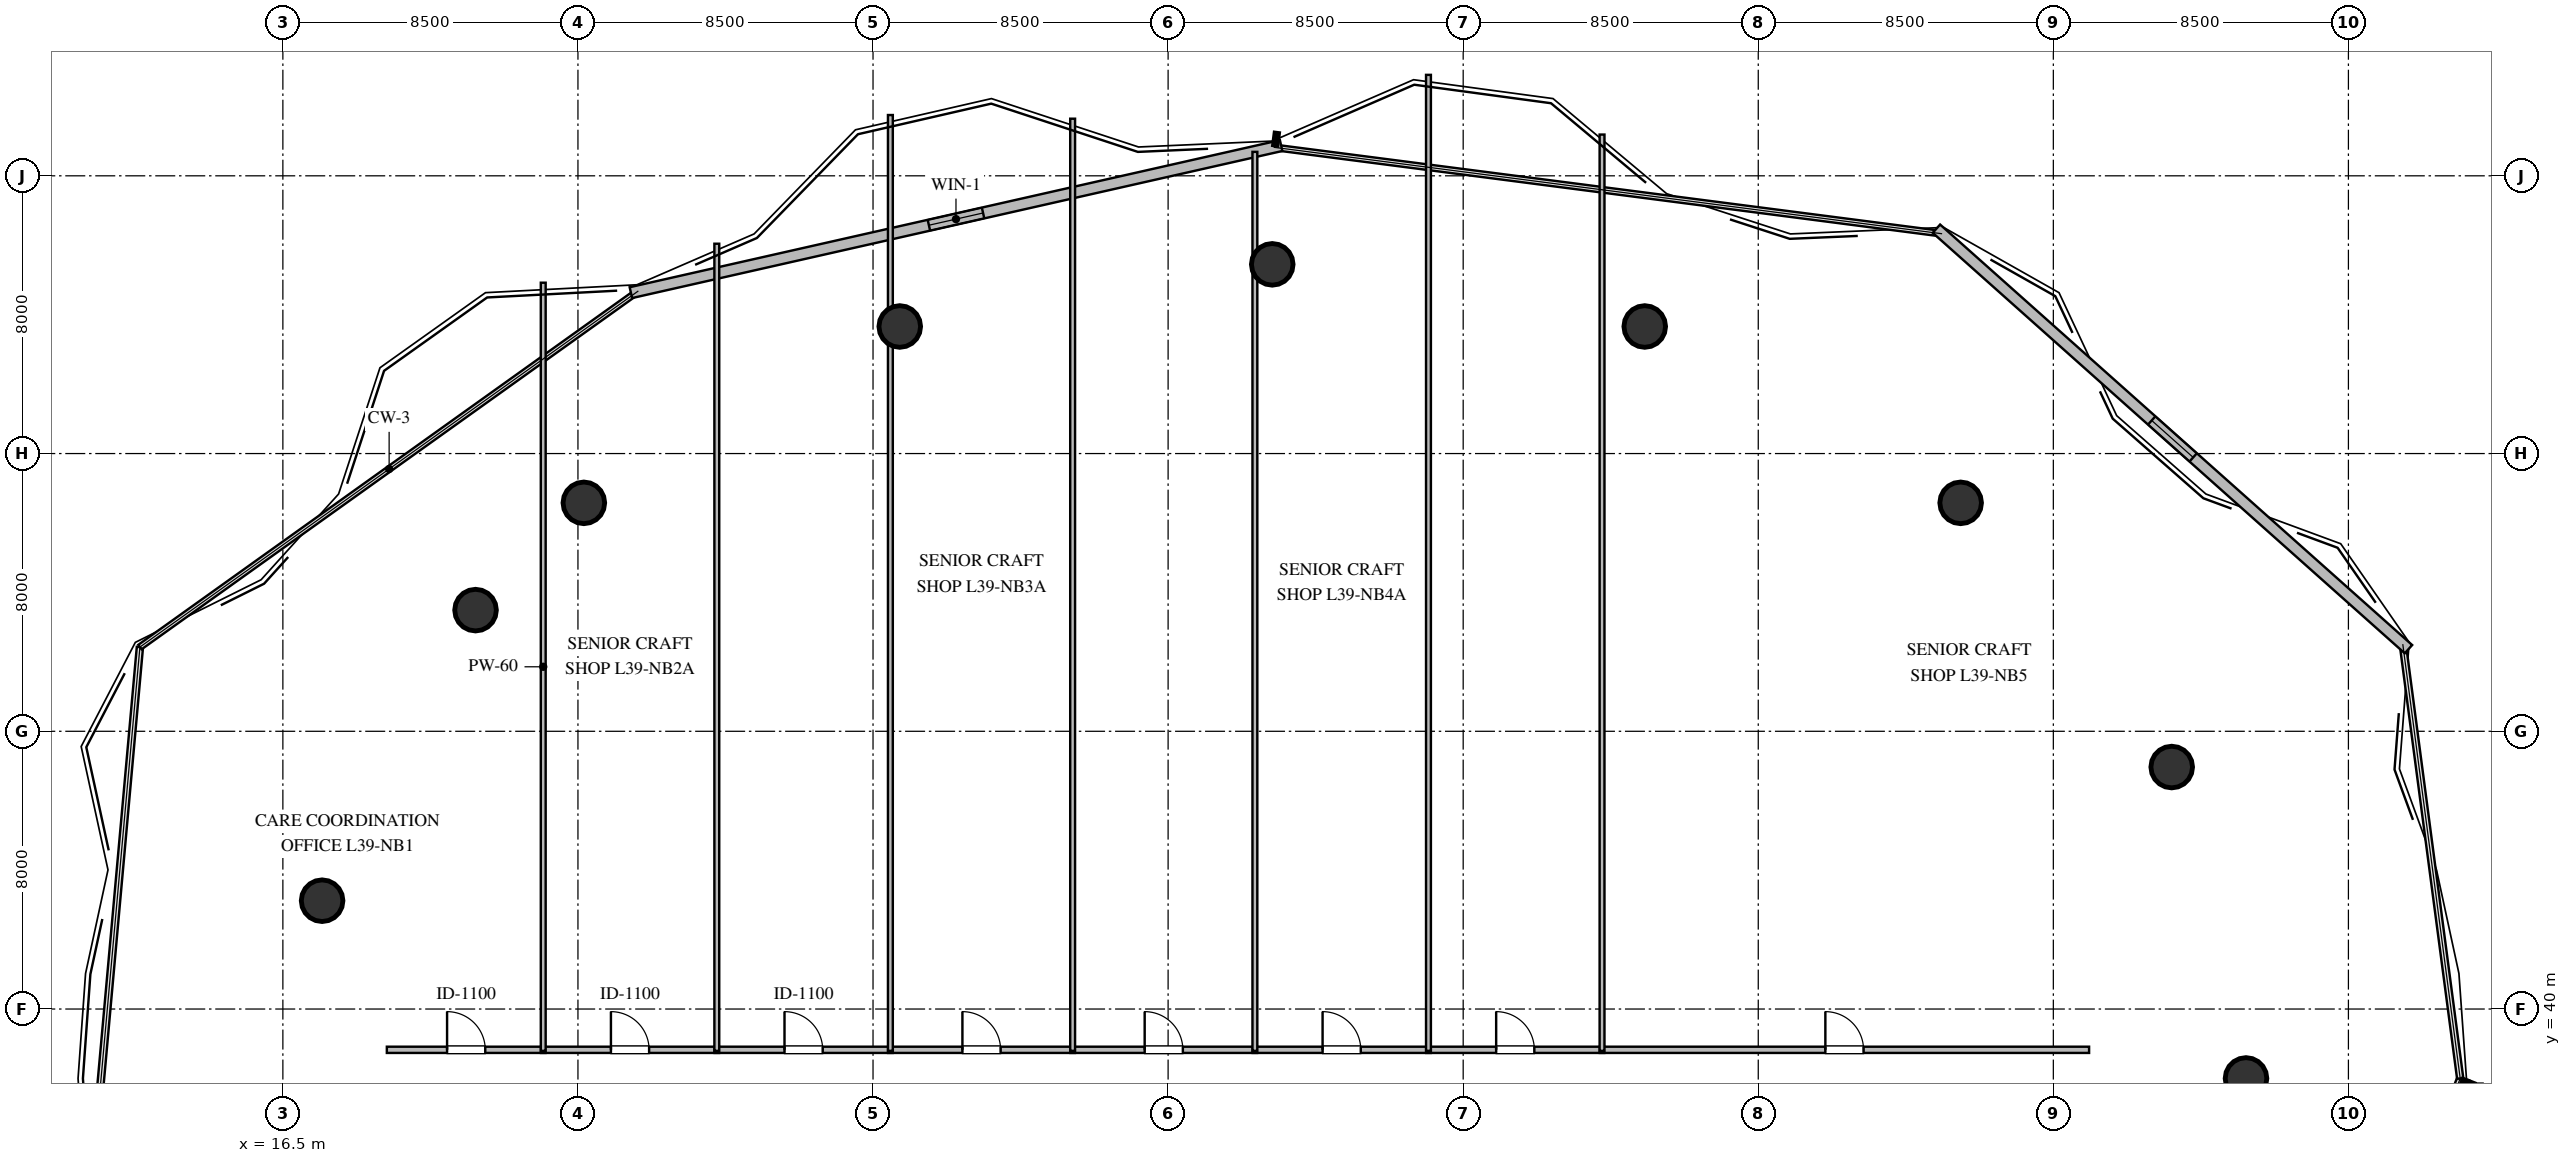
"""IFC4 building model, lengths in metres.
Left out: names, types, materials, properties, quantities, classifications, styles, units other than length and angle.
Written with IfcOpenShell. Run it as: python <this file> out.ifc"""

import sys

from ifc_helpers import new_model, si_unit, direction, frame, frame_2d, origin, origin_2d, place, context, subcontext, project, spatial, rectangle, circle, extrude, element, fill, save


model = new_model("IFC4")
c1 = context("Model", 3, precision=1e-05, world=origin(), true_north=direction((0.0, 1.0)))
c2 = subcontext(c1, "Body", "Model", "MODEL_VIEW")
j1 = project(units=[si_unit("LENGTHUNIT", "METRE"), si_unit("PLANEANGLEUNIT", "RADIAN")], contexts=[c1])
p1 = place(None, origin())
s1 = spatial("IfcSite", under=j1, at=p1, CompositionType="ELEMENT")
p2 = place(p1, origin())
s2 = spatial("IfcBuilding", under=s1, at=p2, CompositionType="ELEMENT")
p3 = place(p2, frame((0.0, 0.0, 149.4)))
s3 = spatial("IfcBuildingStorey", under=s2, at=p3, CompositionType="ELEMENT", Elevation=149.4)
for number, where, z_axis, x_axis in (
    (1, (73.05, 38.0, 0.0), (0.0, 0.0, 1.0), (1.0, 0.0, 0.0)),
    (2, (70.91, 46.97, 0.0), (0.0, 0.0, 1.0), (1.0, 0.0, 0.0)),
    (3, (64.83, 54.58, 0.0), (0.0, 0.0, 1.0), (1.0, 0.0, 0.0)),
    (4, (55.73, 59.66, 0.0), (0.0, 0.0, 1.0), (1.0, 0.0, 0.0)),
    (5, (45.0, 61.45, 0.0), (0.0, 0.0, 1.0), (1.0, 0.0, 0.0)),
    (6, (34.27, 59.66, 0.0), (0.0, 0.0, 1.0), (1.0, 0.0, 0.0)),
    (7, (25.17, 54.58, 0.0), (0.0, 0.0, 1.0), (1.0, 0.0, 0.0)),
    (8, (22.05, 51.49, 0.0), (0.0, 0.0, 1.0), (1.0, 0.0, 0.0)),
    (9, (17.63, 43.12, 0.0), (0.0, 0.0, 1.0), (1.0, 0.0, 0.0)),
):
    element("IfcColumn", number, at=place(p3, frame(where, z_axis=z_axis, x_axis=x_axis)), inside=s3, PredefinedType="COLUMN", context=c2, shape_type="SweptSolid", body=[
        extrude(circle(Radius=0.6, at=origin_2d()), origin(), (0.0, 0.0, 1.0), 3.6),
    ])
p4 = place(p3, frame((26.525, 60.635, 0.0), z_axis=(0.0, 0.0, 1.0), x_axis=(0.975368700272, 0.220580820855, 0.0)))
e10 = element("IfcWall", 10, at=p4, inside=s3, PredefinedType="STANDARD", context=c2, shape_type="SweptSolid", body=[
    extrude(rectangle(XDim=19.204, YDim=0.32, at=frame_2d((9.602, 0.0))), origin(), (0.0, 0.0, 1.0), 3.36),
])
p5 = place(p4, frame((8.801, 0.0, 1.05)))
e11 = element("IfcOpeningElement", 11, at=p5, cuts=e10, PredefinedType="OPENING", context=c2, shape_type="SweptSolid", body=[
    extrude(rectangle(XDim=1.6, YDim=1.5, at=frame_2d((0.8, 0.75))), frame((0.0, 0.17, 0.0), z_axis=(0.0, -1.0, 0.0), x_axis=(1.0, 0.0, 0.0)), (0.0, 0.0, 1.0), 0.34),
])
p6 = place(p3, frame((64.132, 62.477, 0.0), z_axis=(0.0, 0.0, 1.0), x_axis=(0.746726187299, -0.665131566836, 0.0)))
e12 = element("IfcWall", 12, at=p6, inside=s3, PredefinedType="STANDARD", context=c2, shape_type="SweptSolid", body=[
    extrude(rectangle(XDim=18.21, YDim=0.32, at=frame_2d((9.105, 0.0))), origin(), (0.0, 0.0, 1.0), 3.36),
])
p7 = place(p6, frame((8.305, 0.0, 1.05)))
e13 = element("IfcOpeningElement", 13, at=p7, cuts=e12, PredefinedType="OPENING", context=c2, shape_type="SweptSolid", body=[
    extrude(rectangle(XDim=1.6, YDim=1.5, at=frame_2d((0.8, 0.75))), frame((0.0, 0.17, 0.0), z_axis=(0.0, -1.0, 0.0), x_axis=(1.0, 0.0, 0.0)), (0.0, 0.0, 1.0), 0.34),
])
p8 = place(p3, frame((19.495, 38.825, 0.0), z_axis=(0.0, 0.0, 1.0), x_axis=(1.0, 0.0, 0.0)))
e14 = element("IfcWall", 14, at=p8, inside=s3, PredefinedType="PARTITIONING", context=c2, shape_type="SweptSolid", body=[
    extrude(rectangle(XDim=4.57, YDim=0.18, at=frame_2d((2.285, 0.0))), origin(), (0.0, 0.0, 1.0), 3.36),
])
p9 = place(p8, frame((1.735, 0.0, 0.0)))
e15 = element("IfcOpeningElement", 15, at=p9, cuts=e14, PredefinedType="OPENING", context=c2, shape_type="SweptSolid", body=[
    extrude(rectangle(XDim=1.1, YDim=2.1, at=frame_2d((0.55, 1.05))), frame((0.0, 0.1, 0.0), z_axis=(0.0, -1.0, 0.0), x_axis=(1.0, 0.0, 0.0)), (0.0, 0.0, 1.0), 0.2),
])
p10 = place(p3, frame((23.935, 38.825, 0.0), z_axis=(0.0, 0.0, 1.0), x_axis=(1.0, 0.0, 0.0)))
e16 = element("IfcWall", 16, at=p10, inside=s3, PredefinedType="PARTITIONING", context=c2, shape_type="SweptSolid", body=[
    extrude(rectangle(XDim=5.13, YDim=0.18, at=frame_2d((2.565, 0.0))), origin(), (0.0, 0.0, 1.0), 3.36),
])
p11 = place(p10, frame((2.015, 0.0, 0.0)))
e17 = element("IfcOpeningElement", 17, at=p11, cuts=e16, PredefinedType="OPENING", context=c2, shape_type="SweptSolid", body=[
    extrude(rectangle(XDim=1.1, YDim=2.1, at=frame_2d((0.55, 1.05))), frame((0.0, 0.1, 0.0), z_axis=(0.0, -1.0, 0.0), x_axis=(1.0, 0.0, 0.0)), (0.0, 0.0, 1.0), 0.2),
])
p12 = place(p3, frame((28.935, 38.825, 0.0), z_axis=(0.0, 0.0, 1.0), x_axis=(1.0, 0.0, 0.0)))
e18 = element("IfcWall", 18, at=p12, inside=s3, PredefinedType="PARTITIONING", context=c2, shape_type="SweptSolid", body=[
    extrude(rectangle(XDim=5.13, YDim=0.18, at=frame_2d((2.565, 0.0))), origin(), (0.0, 0.0, 1.0), 3.36),
])
p13 = place(p12, frame((2.015, 0.0, 0.0)))
e19 = element("IfcOpeningElement", 19, at=p13, cuts=e18, PredefinedType="OPENING", context=c2, shape_type="SweptSolid", body=[
    extrude(rectangle(XDim=1.1, YDim=2.1, at=frame_2d((0.55, 1.05))), frame((0.0, 0.1, 0.0), z_axis=(0.0, -1.0, 0.0), x_axis=(1.0, 0.0, 0.0)), (0.0, 0.0, 1.0), 0.2),
])
p14 = place(p3, frame((33.935, 38.825, 0.0), z_axis=(0.0, 0.0, 1.0), x_axis=(1.0, 0.0, 0.0)))
e20 = element("IfcWall", 20, at=p14, inside=s3, PredefinedType="PARTITIONING", context=c2, shape_type="SweptSolid", body=[
    extrude(rectangle(XDim=5.38, YDim=0.18, at=frame_2d((2.69, 0.0))), origin(), (0.0, 0.0, 1.0), 3.36),
])
p15 = place(p14, frame((2.14, 0.0, 0.0)))
e21 = element("IfcOpeningElement", 21, at=p15, cuts=e20, PredefinedType="OPENING", context=c2, shape_type="SweptSolid", body=[
    extrude(rectangle(XDim=1.1, YDim=2.1, at=frame_2d((0.55, 1.05))), frame((0.0, 0.1, 0.0), z_axis=(0.0, -1.0, 0.0), x_axis=(1.0, 0.0, 0.0)), (0.0, 0.0, 1.0), 0.2),
])
p16 = place(p3, frame((39.185, 38.825, 0.0), z_axis=(0.0, 0.0, 1.0), x_axis=(1.0, 0.0, 0.0)))
e22 = element("IfcWall", 22, at=p16, inside=s3, PredefinedType="PARTITIONING", context=c2, shape_type="SweptSolid", body=[
    extrude(rectangle(XDim=5.38, YDim=0.18, at=frame_2d((2.69, 0.0))), origin(), (0.0, 0.0, 1.0), 3.36),
])
p17 = place(p16, frame((2.14, 0.0, 0.0)))
e23 = element("IfcOpeningElement", 23, at=p17, cuts=e22, PredefinedType="OPENING", context=c2, shape_type="SweptSolid", body=[
    extrude(rectangle(XDim=1.1, YDim=2.1, at=frame_2d((0.55, 1.05))), frame((0.0, 0.1, 0.0), z_axis=(0.0, -1.0, 0.0), x_axis=(1.0, 0.0, 0.0)), (0.0, 0.0, 1.0), 0.2),
])
p18 = place(p3, frame((44.435, 38.825, 0.0), z_axis=(0.0, 0.0, 1.0), x_axis=(1.0, 0.0, 0.0)))
e24 = element("IfcWall", 24, at=p18, inside=s3, PredefinedType="PARTITIONING", context=c2, shape_type="SweptSolid", body=[
    extrude(rectangle(XDim=5.13, YDim=0.18, at=frame_2d((2.565, 0.0))), origin(), (0.0, 0.0, 1.0), 3.36),
])
p19 = place(p18, frame((2.015, 0.0, 0.0)))
e25 = element("IfcOpeningElement", 25, at=p19, cuts=e24, PredefinedType="OPENING", context=c2, shape_type="SweptSolid", body=[
    extrude(rectangle(XDim=1.1, YDim=2.1, at=frame_2d((0.55, 1.05))), frame((0.0, 0.1, 0.0), z_axis=(0.0, -1.0, 0.0), x_axis=(1.0, 0.0, 0.0)), (0.0, 0.0, 1.0), 0.2),
])
p20 = place(p3, frame((49.435, 38.825, 0.0), z_axis=(0.0, 0.0, 1.0), x_axis=(1.0, 0.0, 0.0)))
e26 = element("IfcWall", 26, at=p20, inside=s3, PredefinedType="PARTITIONING", context=c2, shape_type="SweptSolid", body=[
    extrude(rectangle(XDim=5.13, YDim=0.18, at=frame_2d((2.565, 0.0))), origin(), (0.0, 0.0, 1.0), 3.36),
])
p21 = place(p20, frame((2.015, 0.0, 0.0)))
e27 = element("IfcOpeningElement", 27, at=p21, cuts=e26, PredefinedType="OPENING", context=c2, shape_type="SweptSolid", body=[
    extrude(rectangle(XDim=1.1, YDim=2.1, at=frame_2d((0.55, 1.05))), frame((0.0, 0.1, 0.0), z_axis=(0.0, -1.0, 0.0), x_axis=(1.0, 0.0, 0.0)), (0.0, 0.0, 1.0), 0.2),
])
p22 = place(p3, frame((54.435, 38.825, 0.0), z_axis=(0.0, 0.0, 1.0), x_axis=(1.0, 0.0, 0.0)))
e28 = element("IfcWall", 28, at=p22, inside=s3, PredefinedType="PARTITIONING", context=c2, shape_type="SweptSolid", body=[
    extrude(rectangle(XDim=14.095, YDim=0.18, at=frame_2d((7.047, 0.0))), origin(), (0.0, 0.0, 1.0), 3.36),
])
p23 = place(p22, frame((6.498, 0.0, 0.0)))
e29 = element("IfcOpeningElement", 29, at=p23, cuts=e28, PredefinedType="OPENING", context=c2, shape_type="SweptSolid", body=[
    extrude(rectangle(XDim=1.1, YDim=2.1, at=frame_2d((0.55, 1.05))), frame((0.0, 0.1, 0.0), z_axis=(0.0, -1.0, 0.0), x_axis=(1.0, 0.0, 0.0)), (0.0, 0.0, 1.0), 0.2),
])
p24 = place(p3, frame((24.0, 60.921, 0.0), z_axis=(0.0, 0.0, 1.0), x_axis=(0.0, -1.0, 0.0)))
e30 = element("IfcWall", 30, at=p24, inside=s3, PredefinedType="PARTITIONING", context=c2, shape_type="SweptSolid", body=[
    extrude(rectangle(XDim=22.126, YDim=0.14, at=frame_2d((11.063, 0.0))), origin(), (0.0, 0.0, 1.0), 2.89),
])
p25 = place(p3, frame((29.0, 62.044, 0.0), z_axis=(0.0, 0.0, 1.0), x_axis=(0.0, -1.0, 0.0)))
e31 = element("IfcWall", 31, at=p25, inside=s3, PredefinedType="PARTITIONING", context=c2, shape_type="SweptSolid", body=[
    extrude(rectangle(XDim=23.249, YDim=0.14, at=frame_2d((11.625, 0.0))), origin(), (0.0, 0.0, 1.0), 3.36),
])
p26 = place(p3, frame((34.0, 65.751, 0.0), z_axis=(0.0, 0.0, 1.0), x_axis=(0.0, -1.0, 0.0)))
e32 = element("IfcWall", 32, at=p26, inside=s3, PredefinedType="PARTITIONING", context=c2, shape_type="SweptSolid", body=[
    extrude(rectangle(XDim=26.956, YDim=0.14, at=frame_2d((13.478, 0.0))), origin(), (0.0, 0.0, 1.0), 2.89),
])
p27 = place(p3, frame((39.25, 65.645, 0.0), z_axis=(0.0, 0.0, 1.0), x_axis=(0.0, -1.0, 0.0)))
e33 = element("IfcWall", 33, at=p27, inside=s3, PredefinedType="PARTITIONING", context=c2, shape_type="SweptSolid", body=[
    extrude(rectangle(XDim=26.85, YDim=0.14, at=frame_2d((13.425, 0.0))), origin(), (0.0, 0.0, 1.0), 3.36),
])
p28 = place(p3, frame((44.5, 64.69, 0.0), z_axis=(0.0, 0.0, 1.0), x_axis=(0.0, -1.0, 0.0)))
e34 = element("IfcWall", 34, at=p28, inside=s3, PredefinedType="PARTITIONING", context=c2, shape_type="SweptSolid", body=[
    extrude(rectangle(XDim=25.895, YDim=0.14, at=frame_2d((12.948, 0.0))), origin(), (0.0, 0.0, 1.0), 2.89),
])
p29 = place(p3, frame((49.5, 66.908, 0.0), z_axis=(0.0, 0.0, 1.0), x_axis=(0.0, -1.0, 0.0)))
e35 = element("IfcWall", 35, at=p29, inside=s3, PredefinedType="PARTITIONING", context=c2, shape_type="SweptSolid", body=[
    extrude(rectangle(XDim=28.113, YDim=0.14, at=frame_2d((14.057, 0.0))), origin(), (0.0, 0.0, 1.0), 3.36),
])
p30 = place(p3, frame((54.5, 65.188, 0.0), z_axis=(0.0, 0.0, 1.0), x_axis=(0.0, -1.0, 0.0)))
e36 = element("IfcWall", 36, at=p30, inside=s3, PredefinedType="PARTITIONING", context=c2, shape_type="SweptSolid", body=[
    extrude(rectangle(XDim=26.393, YDim=0.14, at=frame_2d((13.197, 0.0))), origin(), (0.0, 0.0, 1.0), 3.36),
])
p31 = place(p5, origin())
e37 = element("IfcWindow", 37, at=p31, inside=s3, PartitioningType="SINGLE_PANEL", PredefinedType="WINDOW", context=c2, shape_type="SweptSolid", body=[
    extrude(rectangle(XDim=1.6, YDim=1.5, at=frame_2d((0.8, 0.75))), frame((0.0, 0.03, 0.0), z_axis=(0.0, -1.0, 0.0), x_axis=(1.0, 0.0, 0.0)), (0.0, 0.0, 1.0), 0.06),
])
fill(e11, e37)
p32 = place(p7, origin())
e38 = element("IfcWindow", 38, at=p32, inside=s3, PartitioningType="SINGLE_PANEL", PredefinedType="WINDOW", context=c2, shape_type="SweptSolid", body=[
    extrude(rectangle(XDim=1.6, YDim=1.5, at=frame_2d((0.8, 0.75))), frame((0.0, 0.03, 0.0), z_axis=(0.0, -1.0, 0.0), x_axis=(1.0, 0.0, 0.0)), (0.0, 0.0, 1.0), 0.06),
])
fill(e13, e38)
p33 = place(p9, origin())
e39 = element("IfcDoor", 39, at=p33, inside=s3, OperationType="SINGLE_SWING_LEFT", PredefinedType="DOOR", context=c2, shape_type="SweptSolid", body=[
    extrude(rectangle(XDim=1.1, YDim=2.1, at=frame_2d((0.55, 1.05))), frame((0.0, 0.025, 0.0), z_axis=(0.0, -1.0, 0.0), x_axis=(1.0, 0.0, 0.0)), (0.0, 0.0, 1.0), 0.05),
])
fill(e15, e39)
p34 = place(p11, origin())
e40 = element("IfcDoor", 40, at=p34, inside=s3, OperationType="SINGLE_SWING_LEFT", PredefinedType="DOOR", context=c2, shape_type="SweptSolid", body=[
    extrude(rectangle(XDim=1.1, YDim=2.1, at=frame_2d((0.55, 1.05))), frame((0.0, 0.025, 0.0), z_axis=(0.0, -1.0, 0.0), x_axis=(1.0, 0.0, 0.0)), (0.0, 0.0, 1.0), 0.05),
])
fill(e17, e40)
p35 = place(p13, origin())
e41 = element("IfcDoor", 41, at=p35, inside=s3, OperationType="SINGLE_SWING_LEFT", PredefinedType="DOOR", context=c2, shape_type="SweptSolid", body=[
    extrude(rectangle(XDim=1.1, YDim=2.1, at=frame_2d((0.55, 1.05))), frame((0.0, 0.025, 0.0), z_axis=(0.0, -1.0, 0.0), x_axis=(1.0, 0.0, 0.0)), (0.0, 0.0, 1.0), 0.05),
])
fill(e19, e41)
p36 = place(p15, origin())
e42 = element("IfcDoor", 42, at=p36, inside=s3, OperationType="SINGLE_SWING_LEFT", PredefinedType="DOOR", context=c2, shape_type="SweptSolid", body=[
    extrude(rectangle(XDim=1.1, YDim=2.1, at=frame_2d((0.55, 1.05))), frame((0.0, 0.025, 0.0), z_axis=(0.0, -1.0, 0.0), x_axis=(1.0, 0.0, 0.0)), (0.0, 0.0, 1.0), 0.05),
])
fill(e21, e42)
p37 = place(p17, origin())
e43 = element("IfcDoor", 43, at=p37, inside=s3, OperationType="SINGLE_SWING_LEFT", PredefinedType="DOOR", context=c2, shape_type="SweptSolid", body=[
    extrude(rectangle(XDim=1.1, YDim=2.1, at=frame_2d((0.55, 1.05))), frame((0.0, 0.025, 0.0), z_axis=(0.0, -1.0, 0.0), x_axis=(1.0, 0.0, 0.0)), (0.0, 0.0, 1.0), 0.05),
])
fill(e23, e43)
p38 = place(p19, origin())
e44 = element("IfcDoor", 44, at=p38, inside=s3, OperationType="SINGLE_SWING_LEFT", PredefinedType="DOOR", context=c2, shape_type="SweptSolid", body=[
    extrude(rectangle(XDim=1.1, YDim=2.1, at=frame_2d((0.55, 1.05))), frame((0.0, 0.025, 0.0), z_axis=(0.0, -1.0, 0.0), x_axis=(1.0, 0.0, 0.0)), (0.0, 0.0, 1.0), 0.05),
])
fill(e25, e44)
p39 = place(p21, origin())
e45 = element("IfcDoor", 45, at=p39, inside=s3, OperationType="SINGLE_SWING_LEFT", PredefinedType="DOOR", context=c2, shape_type="SweptSolid", body=[
    extrude(rectangle(XDim=1.1, YDim=2.1, at=frame_2d((0.55, 1.05))), frame((0.0, 0.025, 0.0), z_axis=(0.0, -1.0, 0.0), x_axis=(1.0, 0.0, 0.0)), (0.0, 0.0, 1.0), 0.05),
])
fill(e27, e45)
p40 = place(p23, origin())
e46 = element("IfcDoor", 46, at=p40, inside=s3, OperationType="SINGLE_SWING_LEFT", PredefinedType="DOOR", context=c2, shape_type="SweptSolid", body=[
    extrude(rectangle(XDim=1.1, YDim=2.1, at=frame_2d((0.55, 1.05))), frame((0.0, 0.025, 0.0), z_axis=(0.0, -1.0, 0.0), x_axis=(1.0, 0.0, 0.0)), (0.0, 0.0, 1.0), 0.05),
])
fill(e29, e46)
save(model, sys.argv[1])
